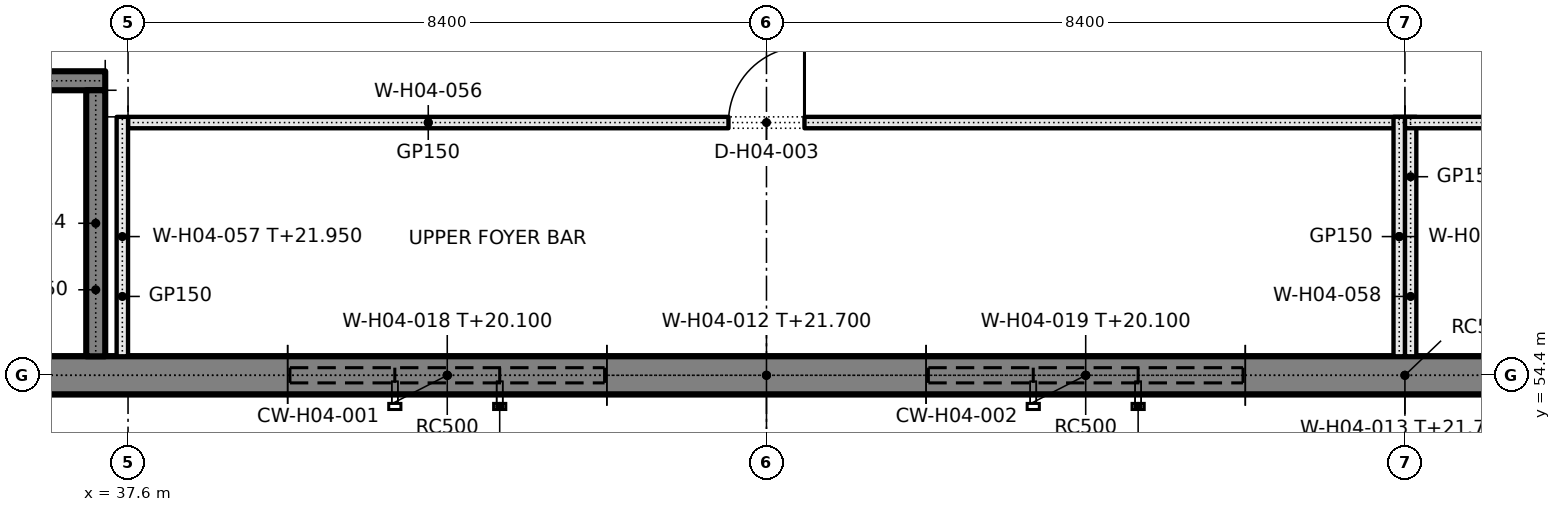
"""IFC4 building model, lengths in metres.
Left out: names, types, materials, properties, quantities, classifications, styles, units other than length and angle.
Written with IfcOpenShell. Run it as: python <this file> out.ifc"""

import sys

from ifc_helpers import new_model, si_unit, direction, frame, frame_2d, origin, place, context, subcontext, project, spatial, rectangle, extrude, element, fill, save


model = new_model("IFC4")
c1 = context("Model", 3, precision=1e-05, world=origin(), true_north=direction((0.0, 1.0)))
c2 = subcontext(c1, "Body", "Model", "MODEL_VIEW")
j1 = project(units=[si_unit("LENGTHUNIT", "METRE"), si_unit("PLANEANGLEUNIT", "RADIAN")], contexts=[c1])
p1 = place(None, origin())
s1 = spatial("IfcSite", under=j1, at=p1, CompositionType="ELEMENT")
p2 = place(p1, origin())
s2 = spatial("IfcBuilding", under=s1, at=p2, CompositionType="ELEMENT")
p3 = place(p2, frame((0.0, 0.0, 19.2)))
s3 = spatial("IfcBuildingStorey", under=s2, at=p3, CompositionType="ELEMENT", Elevation=19.2)
p4 = place(p3, frame((29.45, 54.4, 0.0), z_axis=(0.0, 0.0, 1.0), x_axis=(1.0, 0.0, 0.0)))
e1 = element("IfcWall", 1, at=p4, inside=s3, PredefinedType="SOLIDWALL", context=c2, shape_type="SweptSolid", body=[
    extrude(rectangle(XDim=10.25, YDim=0.5, at=frame_2d((5.125, 0.0))), origin(), (0.0, 0.0, 1.0), 2.5),
])
p5 = place(p3, frame((43.9, 54.4, 0.0), z_axis=(0.0, 0.0, 1.0), x_axis=(1.0, 0.0, 0.0)))
e2 = element("IfcWall", 2, at=p5, inside=s3, PredefinedType="SOLIDWALL", context=c2, shape_type="SweptSolid", body=[
    extrude(rectangle(XDim=4.2, YDim=0.5, at=frame_2d((2.1, 0.0))), origin(), (0.0, 0.0, 1.0), 2.5),
])
p6 = place(p3, frame((52.3, 54.4, 0.0), z_axis=(0.0, 0.0, 1.0), x_axis=(1.0, 0.0, 0.0)))
e3 = element("IfcWall", 3, at=p6, inside=s3, PredefinedType="SOLIDWALL", context=c2, shape_type="SweptSolid", body=[
    extrude(rectangle(XDim=4.2, YDim=0.5, at=frame_2d((2.1, 0.0))), origin(), (0.0, 0.0, 1.0), 2.5),
])
for number, where, z_axis, x_axis in (
    (4, (39.7, 54.4, 0.0), (0.0, 0.0, 1.0), (1.0, 0.0, 0.0)),
    (5, (48.1, 54.4, 0.0), (0.0, 0.0, 1.0), (1.0, 0.0, 0.0)),
):
    element("IfcWall", number, at=place(p3, frame(where, z_axis=z_axis, x_axis=x_axis)), inside=s3, PredefinedType="SOLIDWALL", context=c2, shape_type="SweptSolid", body=[
        extrude(rectangle(XDim=4.2, YDim=0.5, at=frame_2d((2.1, 0.0))), origin(), (0.0, 0.0, 1.0), 0.9),
    ])
p7 = place(p3, frame((29.45, 54.4, 2.5), z_axis=(0.0, 0.0, 1.0), x_axis=(1.0, 0.0, 0.0)))
e6 = element("IfcWall", 6, at=p7, inside=s3, PredefinedType="SOLIDWALL", context=c2, shape_type="SweptSolid", body=[
    extrude(rectangle(XDim=66.7, YDim=0.5, at=frame_2d((33.35, 0.0))), origin(), (0.0, 0.0, 1.0), 1.1),
])
p8 = place(p3, frame((29.45, 58.275, 0.0), z_axis=(0.0, 0.0, 1.0), x_axis=(1.0, 0.0, 0.0)))
e7 = element("IfcWall", 7, at=p8, inside=s3, PredefinedType="SOLIDWALL", context=c2, shape_type="SweptSolid", body=[
    extrude(rectangle(XDim=7.85, YDim=0.25, at=frame_2d((3.925, 0.0))), origin(), (0.0, 0.0, 1.0), 3.35),
])
p9 = place(p8, frame((0.25, 0.0, 0.0)))
e8 = element("IfcOpeningElement", 8, at=p9, cuts=e7, PredefinedType="OPENING", context=c2, shape_type="SweptSolid", body=[
    extrude(rectangle(XDim=1.2, YDim=2.1, at=frame_2d((0.6, 1.05))), frame((0.0, 0.135, 0.0), z_axis=(0.0, -1.0, 0.0), x_axis=(1.0, 0.0, 0.0)), (0.0, 0.0, 1.0), 0.27),
])
p10 = place(p3, frame((37.175, 54.65, 0.0), z_axis=(0.0, 0.0, 1.0), x_axis=(0.0, 1.0, 0.0)))
e9 = element("IfcWall", 9, at=p10, inside=s3, PredefinedType="SOLIDWALL", context=c2, shape_type="SweptSolid", body=[
    extrude(rectangle(XDim=3.5, YDim=0.25, at=frame_2d((1.75, 0.0))), origin(), (0.0, 0.0, 1.0), 3.35),
])
p11 = place(p3, frame((37.6, 57.725, 0.0), z_axis=(0.0, 0.0, 1.0), x_axis=(1.0, 0.0, 0.0)))
e10 = element("IfcWall", 10, at=p11, inside=s3, PredefinedType="PARTITIONING", context=c2, shape_type="SweptSolid", body=[
    extrude(rectangle(XDim=16.8, YDim=0.15, at=frame_2d((8.4, 0.0))), origin(), (0.0, 0.0, 1.0), 3.35),
])
p12 = place(p11, frame((7.9, 0.0, 0.0)))
e11 = element("IfcOpeningElement", 11, at=p12, cuts=e10, PredefinedType="OPENING", context=c2, shape_type="SweptSolid", body=[
    extrude(rectangle(XDim=1.0, YDim=2.1, at=frame_2d((0.5, 1.05))), frame((0.0, 0.085, 0.0), z_axis=(0.0, -1.0, 0.0), x_axis=(1.0, 0.0, 0.0)), (0.0, 0.0, 1.0), 0.17),
])
p13 = place(p3, frame((37.525, 54.65, 0.0), z_axis=(0.0, 0.0, 1.0), x_axis=(0.0, 1.0, 0.0)))
e12 = element("IfcWall", 12, at=p13, inside=s3, PredefinedType="PARTITIONING", context=c2, shape_type="SweptSolid", body=[
    extrude(rectangle(XDim=3.15, YDim=0.15, at=frame_2d((1.575, 0.0))), origin(), (0.0, 0.0, 1.0), 2.75),
])
p14 = place(p3, frame((54.475, 54.65, 0.0), z_axis=(0.0, 0.0, 1.0), x_axis=(0.0, 1.0, 0.0)))
e13 = element("IfcWall", 13, at=p14, inside=s3, PredefinedType="PARTITIONING", context=c2, shape_type="SweptSolid", body=[
    extrude(rectangle(XDim=3.15, YDim=0.15, at=frame_2d((1.575, 0.0))), origin(), (0.0, 0.0, 1.0), 3.35),
])
p15 = place(p3, frame((54.4, 57.725, 0.0), z_axis=(0.0, 0.0, 1.0), x_axis=(1.0, 0.0, 0.0)))
e14 = element("IfcWall", 14, at=p15, inside=s3, PredefinedType="PARTITIONING", context=c2, shape_type="SweptSolid", body=[
    extrude(rectangle(XDim=8.4, YDim=0.15, at=frame_2d((4.2, 0.0))), origin(), (0.0, 0.0, 1.0), 3.35),
])
p16 = place(p15, frame((3.7, 0.0, 0.0)))
e15 = element("IfcOpeningElement", 15, at=p16, cuts=e14, PredefinedType="OPENING", context=c2, shape_type="SweptSolid", body=[
    extrude(rectangle(XDim=1.0, YDim=2.1, at=frame_2d((0.5, 1.05))), frame((0.0, 0.085, 0.0), z_axis=(0.0, -1.0, 0.0), x_axis=(1.0, 0.0, 0.0)), (0.0, 0.0, 1.0), 0.17),
])
p17 = place(p3, frame((54.325, 54.65, 0.0), z_axis=(0.0, 0.0, 1.0), x_axis=(0.0, 1.0, 0.0)))
e16 = element("IfcWall", 16, at=p17, inside=s3, PredefinedType="PARTITIONING", context=c2, shape_type="SweptSolid", body=[
    extrude(rectangle(XDim=3.15, YDim=0.15, at=frame_2d((1.575, 0.0))), origin(), (0.0, 0.0, 1.0), 3.35),
])
p18 = place(p12, origin())
e17 = element("IfcDoor", 17, at=p18, inside=s3, OperationType="SINGLE_SWING_RIGHT", PredefinedType="DOOR", context=c2, shape_type="SweptSolid", body=[
    extrude(rectangle(XDim=1.0, YDim=2.1, at=frame_2d((0.5, 1.05))), frame((0.0, 0.025, 0.0), z_axis=(0.0, -1.0, 0.0), x_axis=(1.0, 0.0, 0.0)), (0.0, 0.0, 1.0), 0.05),
])
fill(e11, e17)
save(model, sys.argv[1])
